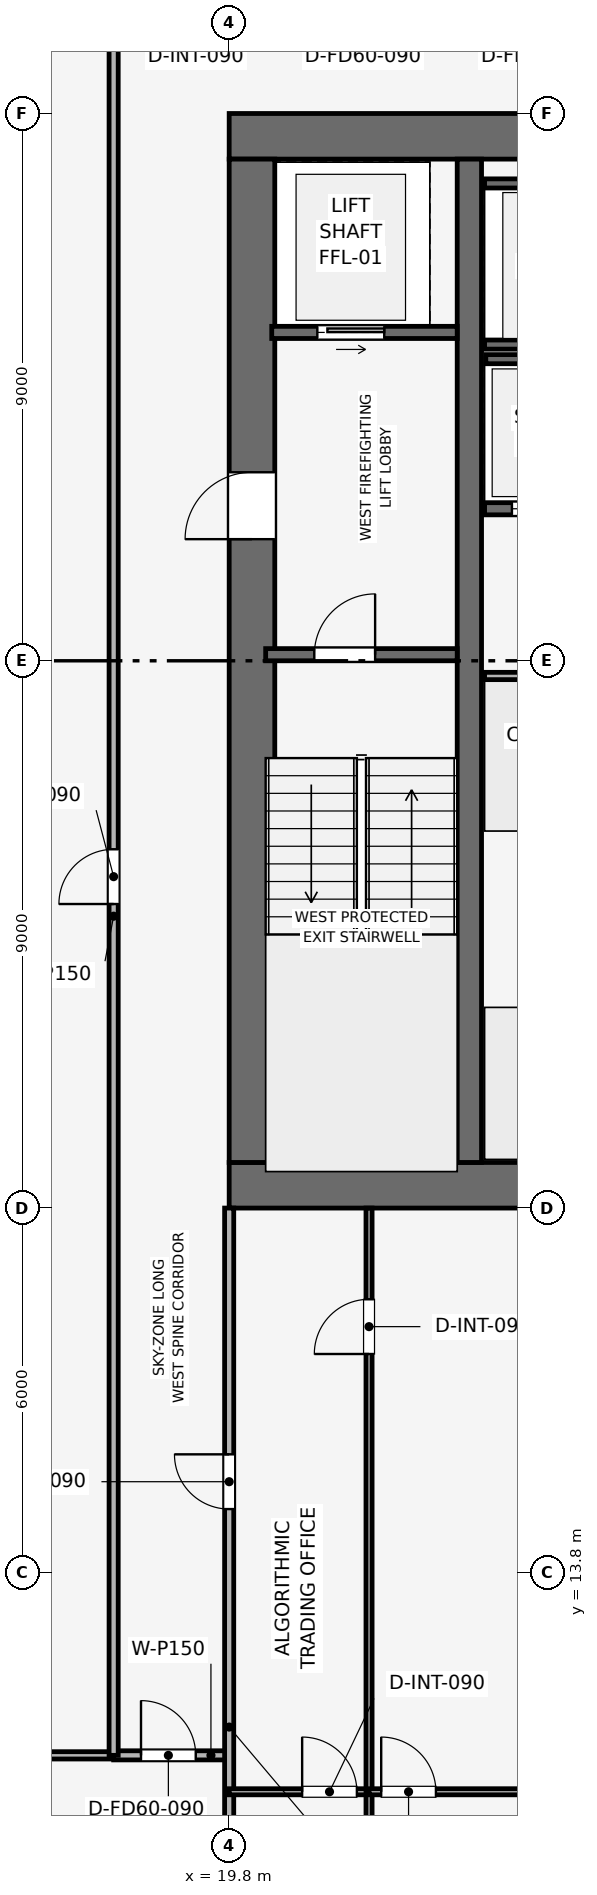
"""IFC4 building model, lengths in metres.
Left out: names, types, materials, properties, quantities, classifications, styles, units other than length and angle.
Written with IfcOpenShell. Run it as: python <this file> out.ifc"""

import sys

from ifc_helpers import new_model, si_unit, direction, frame, frame_2d, origin, place, context, subcontext, project, spatial, rectangle, extrude, element, fill, save


model = new_model("IFC4")
c1 = context("Model", 3, precision=1e-05, world=origin(), true_north=direction((0.0, 1.0)))
c2 = subcontext(c1, "Body", "Model", "MODEL_VIEW")
j1 = project(units=[si_unit("LENGTHUNIT", "METRE"), si_unit("PLANEANGLEUNIT", "RADIAN")], contexts=[c1])
p1 = place(None, origin())
s1 = spatial("IfcSite", under=j1, at=p1, CompositionType="ELEMENT")
p2 = place(p1, origin())
s2 = spatial("IfcBuilding", under=s1, at=p2, CompositionType="ELEMENT")
p3 = place(p2, frame((0.0, 0.0, 280.35)))
s3 = spatial("IfcBuildingStorey", under=s2, at=p3, CompositionType="ELEMENT", Elevation=280.35)
p4 = place(p3, frame((19.8, 20.175, 0.0), z_axis=(0.0, 0.0, 1.0), x_axis=(1.0, 0.0, 0.0)))
e1 = element("IfcWall", 1, at=p4, inside=s3, PredefinedType="SHEAR", context=c2, shape_type="SweptSolid", body=[
    extrude(rectangle(XDim=18.0, YDim=0.75, at=frame_2d((9.0, 0.0))), origin(), (0.0, 0.0, 1.0), 3.75),
])
p5 = place(p3, frame((19.8, 37.425, 0.0), z_axis=(0.0, 0.0, 1.0), x_axis=(1.0, 0.0, 0.0)))
e2 = element("IfcWall", 2, at=p5, inside=s3, PredefinedType="SHEAR", context=c2, shape_type="SweptSolid", body=[
    extrude(rectangle(XDim=18.0, YDim=0.75, at=frame_2d((9.0, 0.0))), origin(), (0.0, 0.0, 1.0), 3.75),
])
p6 = place(p5, frame((7.05, 0.0, 0.0)))
e3 = element("IfcOpeningElement", 3, at=p6, cuts=e2, PredefinedType="OPENING", context=c2, shape_type="SweptSolid", body=[
    extrude(rectangle(XDim=1.1, YDim=2.15, at=frame_2d((0.55, 1.075))), frame((0.0, 0.385, 0.0), z_axis=(0.0, -1.0, 0.0), x_axis=(1.0, 0.0, 0.0)), (0.0, 0.0, 1.0), 0.77),
])
p7 = place(p3, frame((20.175, 20.55, 0.0), z_axis=(0.0, 0.0, 1.0), x_axis=(0.0, 1.0, 0.0)))
e4 = element("IfcWall", 4, at=p7, inside=s3, PredefinedType="SHEAR", context=c2, shape_type="SweptSolid", body=[
    extrude(rectangle(XDim=16.5, YDim=0.75, at=frame_2d((8.25, 0.0))), origin(), (0.0, 0.0, 1.0), 3.75),
])
p8 = place(p7, frame((10.25, 0.0, 0.0)))
e5 = element("IfcOpeningElement", 5, at=p8, cuts=e4, PredefinedType="OPENING", context=c2, shape_type="SweptSolid", body=[
    extrude(rectangle(XDim=1.1, YDim=2.15, at=frame_2d((0.55, 1.075))), frame((0.0, 0.385, 0.0), z_axis=(0.0, -1.0, 0.0), x_axis=(1.0, 0.0, 0.0)), (0.0, 0.0, 1.0), 0.77),
])
p9 = place(p3, frame((23.75, 20.55, 0.0), z_axis=(0.0, 0.0, 1.0), x_axis=(0.0, 1.0, 0.0)))
e6 = element("IfcWall", 6, at=p9, inside=s3, PredefinedType="SHEAR", context=c2, shape_type="SweptSolid", body=[
    extrude(rectangle(XDim=16.5, YDim=0.4, at=frame_2d((8.25, 0.0))), origin(), (0.0, 0.0, 1.0), 3.75),
])
p10 = place(p3, frame((20.4, 28.9, 0.0), z_axis=(0.0, 0.0, 1.0), x_axis=(1.0, 0.0, 0.0)))
e7 = element("IfcWall", 7, at=p10, inside=s3, PredefinedType="SHEAR", context=c2, shape_type="SweptSolid", body=[
    extrude(rectangle(XDim=3.15, YDim=0.2, at=frame_2d((1.575, 0.0))), origin(), (0.0, 0.0, 1.0), 3.39),
])
p11 = place(p10, frame((0.8, 0.0, 0.0)))
e8 = element("IfcOpeningElement", 8, at=p11, cuts=e7, PredefinedType="OPENING", context=c2, shape_type="SweptSolid", body=[
    extrude(rectangle(XDim=1.0, YDim=2.1, at=frame_2d((0.5, 1.05))), frame((0.0, 0.11, 0.0), z_axis=(0.0, -1.0, 0.0), x_axis=(1.0, 0.0, 0.0)), (0.0, 0.0, 1.0), 0.22),
])
p12 = place(p3, frame((20.5, 34.2, 0.0), z_axis=(0.0, 0.0, 1.0), x_axis=(1.0, 0.0, 0.0)))
e9 = element("IfcWall", 9, at=p12, inside=s3, PredefinedType="SHEAR", context=c2, shape_type="SweptSolid", body=[
    extrude(rectangle(XDim=3.05, YDim=0.2, at=frame_2d((1.525, 0.0))), origin(), (0.0, 0.0, 1.0), 3.39),
])
p13 = place(p12, frame((0.75, 0.0, 0.0)))
e10 = element("IfcOpeningElement", 10, at=p13, cuts=e9, PredefinedType="OPENING", context=c2, shape_type="SweptSolid", body=[
    extrude(rectangle(XDim=1.1, YDim=2.15, at=frame_2d((0.55, 1.075))), frame((0.0, 0.11, 0.0), z_axis=(0.0, -1.0, 0.0), x_axis=(1.0, 0.0, 0.0)), (0.0, 0.0, 1.0), 0.22),
])
for number, where, z_axis, x_axis in (
    (11, (24.0, 34.0, 0.0), (0.0, 0.0, 1.0), (1.0, 0.0, 0.0)),
    (12, (24.0, 36.65, 0.0), (0.0, 0.0, 1.0), (1.0, 0.0, 0.0)),
):
    element("IfcWall", number, at=place(p3, frame(where, z_axis=z_axis, x_axis=x_axis)), inside=s3, PredefinedType="SHEAR", context=c2, shape_type="SweptSolid", body=[
        extrude(rectangle(XDim=2.48, YDim=0.15, at=frame_2d((1.24, 0.0))), origin(), (0.0, 0.0, 1.0), 3.39),
    ])
p14 = place(p3, frame((24.0, 31.3, 0.0), z_axis=(0.0, 0.0, 1.0), x_axis=(1.0, 0.0, 0.0)))
e13 = element("IfcWall", 13, at=p14, inside=s3, PredefinedType="SHEAR", context=c2, shape_type="SweptSolid", body=[
    extrude(rectangle(XDim=2.0, YDim=0.2, at=frame_2d((1.0, 0.0))), origin(), (0.0, 0.0, 1.0), 3.39),
])
p15 = place(p14, frame((0.45, 0.0, 0.0)))
e14 = element("IfcOpeningElement", 14, at=p15, cuts=e13, PredefinedType="OPENING", context=c2, shape_type="SweptSolid", body=[
    extrude(rectangle(XDim=1.1, YDim=2.15, at=frame_2d((0.55, 1.075))), frame((0.0, 0.11, 0.0), z_axis=(0.0, -1.0, 0.0), x_axis=(1.0, 0.0, 0.0)), (0.0, 0.0, 1.0), 0.22),
])
p16 = place(p3, frame((24.02, 33.76, 0.0), z_axis=(0.0, 0.0, 1.0), x_axis=(1.0, 0.0, 0.0)))
e15 = element("IfcWall", 15, at=p16, inside=s3, PredefinedType="SHEAR", context=c2, shape_type="SweptSolid", body=[
    extrude(rectangle(XDim=4.08, YDim=0.15, at=frame_2d((2.04, 0.0))), origin(), (0.0, 0.0, 1.0), 3.39),
])
p17 = place(p3, frame((24.0, 28.55, 0.0), z_axis=(0.0, 0.0, 1.0), x_axis=(1.0, 0.0, 0.0)))
e16 = element("IfcWall", 16, at=p17, inside=s3, PredefinedType="PARTITIONING", context=c2, shape_type="SweptSolid", body=[
    extrude(rectangle(XDim=4.05, YDim=0.12, at=frame_2d((2.025, 0.0))), origin(), (0.0, 0.0, 1.0), 3.39),
])
p18 = place(p17, frame((1.575, 0.0, 0.0)))
e17 = element("IfcOpeningElement", 17, at=p18, cuts=e16, PredefinedType="OPENING", context=c2, shape_type="SweptSolid", body=[
    extrude(rectangle(XDim=0.9, YDim=2.1, at=frame_2d((0.45, 1.05))), frame((0.0, 0.07, 0.0), z_axis=(0.0, -1.0, 0.0), x_axis=(1.0, 0.0, 0.0)), (0.0, 0.0, 1.0), 0.14),
])
p19 = place(p3, frame((10.8, 10.8, 0.0), z_axis=(0.0, 0.0, 1.0), x_axis=(1.0, 0.0, 0.0)))
e18 = element("IfcWall", 18, at=p19, inside=s3, PredefinedType="PARTITIONING", context=c2, shape_type="SweptSolid", body=[
    extrude(rectangle(XDim=7.1, YDim=0.12, at=frame_2d((3.55, 0.0))), origin(), (0.0, 0.0, 1.0), 2.975),
])
p20 = place(p3, frame((17.9, 10.8, 0.0), z_axis=(0.0, 0.0, 1.0), x_axis=(1.0, 0.0, 0.0)))
e19 = element("IfcWall", 19, at=p20, inside=s3, PredefinedType="PARTITIONING", context=c2, shape_type="SweptSolid", body=[
    extrude(rectangle(XDim=1.9, YDim=0.15, at=frame_2d((0.95, 0.0))), origin(), (0.0, 0.0, 1.0), 3.39),
])
p21 = place(p20, frame((0.45, 0.0, 0.0)))
e20 = element("IfcOpeningElement", 20, at=p21, cuts=e19, PredefinedType="OPENING", context=c2, shape_type="SweptSolid", body=[
    extrude(rectangle(XDim=0.9, YDim=2.1, at=frame_2d((0.45, 1.05))), frame((0.0, 0.085, 0.0), z_axis=(0.0, -1.0, 0.0), x_axis=(1.0, 0.0, 0.0)), (0.0, 0.0, 1.0), 0.17),
])
p22 = place(p3, frame((19.8, 4.03, 0.0), z_axis=(0.0, 0.0, 1.0), x_axis=(0.0, 1.0, 0.0)))
e21 = element("IfcWall", 21, at=p22, inside=s3, PredefinedType="PARTITIONING", context=c2, shape_type="SweptSolid", body=[
    extrude(rectangle(XDim=15.77, YDim=0.15, at=frame_2d((7.885, 0.0))), origin(), (0.0, 0.0, 1.0), 2.975),
])
p23 = place(p22, frame((10.82, 0.0, 0.0)))
e22 = element("IfcOpeningElement", 22, at=p23, cuts=e21, PredefinedType="OPENING", context=c2, shape_type="SweptSolid", body=[
    extrude(rectangle(XDim=0.9, YDim=2.1, at=frame_2d((0.45, 1.05))), frame((0.0, 0.085, 0.0), z_axis=(0.0, -1.0, 0.0), x_axis=(1.0, 0.0, 0.0)), (0.0, 0.0, 1.0), 0.17),
])
p24 = place(p3, frame((19.8, 10.201, 0.0), z_axis=(0.0, 0.0, 1.0), x_axis=(1.0, 0.0, 0.0)))
e23 = element("IfcWall", 23, at=p24, inside=s3, PredefinedType="MOVABLE", context=c2, shape_type="SweptSolid", body=[
    extrude(rectangle(XDim=2.3, YDim=0.1, at=frame_2d((1.15, 0.0))), origin(), (0.0, 0.0, 1.0), 2.975),
])
p25 = place(p24, frame((1.2, 0.0, 0.0)))
e24 = element("IfcOpeningElement", 24, at=p25, cuts=e23, PredefinedType="OPENING", context=c2, shape_type="SweptSolid", body=[
    extrude(rectangle(XDim=0.9, YDim=2.1, at=frame_2d((0.45, 1.05))), frame((0.0, 0.06, 0.0), z_axis=(0.0, -1.0, 0.0), x_axis=(1.0, 0.0, 0.0)), (0.0, 0.0, 1.0), 0.12),
])
p26 = place(p3, frame((22.1, 4.03, 0.0), z_axis=(0.0, 0.0, 1.0), x_axis=(0.0, 1.0, 0.0)))
e25 = element("IfcWall", 25, at=p26, inside=s3, PredefinedType="MOVABLE", context=c2, shape_type="SweptSolid", body=[
    extrude(rectangle(XDim=15.77, YDim=0.1, at=frame_2d((7.885, 0.0))), origin(), (0.0, 0.0, 1.0), 2.975),
])
p27 = place(p26, frame((13.37, 0.0, 0.0)))
e26 = element("IfcOpeningElement", 26, at=p27, cuts=e25, PredefinedType="OPENING", context=c2, shape_type="SweptSolid", body=[
    extrude(rectangle(XDim=0.9, YDim=2.1, at=frame_2d((0.45, 1.05))), frame((0.0, 0.06, 0.0), z_axis=(0.0, -1.0, 0.0), x_axis=(1.0, 0.0, 0.0)), (0.0, 0.0, 1.0), 0.12),
])
p28 = place(p3, frame((22.1, 10.201, 0.0), z_axis=(0.0, 0.0, 1.0), x_axis=(1.0, 0.0, 0.0)))
e27 = element("IfcWall", 27, at=p28, inside=s3, PredefinedType="MOVABLE", context=c2, shape_type="SweptSolid", body=[
    extrude(rectangle(XDim=10.992, YDim=0.1, at=frame_2d((5.496, 0.0))), origin(), (0.0, 0.0, 1.0), 2.975),
])
p29 = place(p28, frame((0.2, 0.0, 0.0)))
e28 = element("IfcOpeningElement", 28, at=p29, cuts=e27, PredefinedType="OPENING", context=c2, shape_type="SweptSolid", body=[
    extrude(rectangle(XDim=0.9, YDim=2.1, at=frame_2d((0.45, 1.05))), frame((0.0, 0.06, 0.0), z_axis=(0.0, -1.0, 0.0), x_axis=(1.0, 0.0, 0.0)), (0.0, 0.0, 1.0), 0.12),
])
p30 = place(p3, frame((17.9, 10.8, 0.0), z_axis=(0.0, 0.0, 1.0), x_axis=(0.0, 1.0, 0.0)))
e29 = element("IfcWall", 29, at=p30, inside=s3, PredefinedType="PARTITIONING", context=c2, shape_type="SweptSolid", body=[
    extrude(rectangle(XDim=28.9, YDim=0.15, at=frame_2d((14.45, 0.0))), origin(), (0.0, 0.0, 1.0), 2.975),
])
p31 = place(p30, frame((14.0, 0.0, 0.0)))
e30 = element("IfcOpeningElement", 30, at=p31, cuts=e29, PredefinedType="OPENING", context=c2, shape_type="SweptSolid", body=[
    extrude(rectangle(XDim=0.9, YDim=2.1, at=frame_2d((0.45, 1.05))), frame((0.0, 0.085, 0.0), z_axis=(0.0, -1.0, 0.0), x_axis=(1.0, 0.0, 0.0)), (0.0, 0.0, 1.0), 0.17),
])
p32 = place(p11, origin())
e31 = element("IfcDoor", 31, at=p32, inside=s3, OperationType="SINGLE_SWING_RIGHT", PredefinedType="DOOR", context=c2, shape_type="SweptSolid", body=[
    extrude(rectangle(XDim=1.0, YDim=2.1, at=frame_2d((0.5, 1.05))), frame((0.0, 0.025, 0.0), z_axis=(0.0, -1.0, 0.0), x_axis=(1.0, 0.0, 0.0)), (0.0, 0.0, 1.0), 0.05),
])
fill(e8, e31)
p33 = place(p13, origin())
e32 = element("IfcDoor", 32, at=p33, inside=s3, OperationType="SLIDING_TO_RIGHT", PredefinedType="DOOR", context=c2, shape_type="SweptSolid", body=[
    extrude(rectangle(XDim=1.1, YDim=2.15, at=frame_2d((0.55, 1.075))), frame((0.0, 0.025, 0.0), z_axis=(0.0, -1.0, 0.0), x_axis=(1.0, 0.0, 0.0)), (0.0, 0.0, 1.0), 0.05),
])
fill(e10, e32)
p34 = place(p15, origin())
e33 = element("IfcDoor", 33, at=p34, inside=s3, OperationType="SLIDING_TO_RIGHT", PredefinedType="DOOR", context=c2, shape_type="SweptSolid", body=[
    extrude(rectangle(XDim=1.1, YDim=2.15, at=frame_2d((0.55, 1.075))), frame((0.0, 0.025, 0.0), z_axis=(0.0, -1.0, 0.0), x_axis=(1.0, 0.0, 0.0)), (0.0, 0.0, 1.0), 0.05),
])
fill(e14, e33)
p35 = place(p21, origin())
e34 = element("IfcDoor", 34, at=p35, inside=s3, OperationType="SINGLE_SWING_LEFT", PredefinedType="DOOR", context=c2, shape_type="SweptSolid", body=[
    extrude(rectangle(XDim=0.9, YDim=2.1, at=frame_2d((0.45, 1.05))), frame((0.0, 0.025, 0.0), z_axis=(0.0, -1.0, 0.0), x_axis=(1.0, 0.0, 0.0)), (0.0, 0.0, 1.0), 0.05),
])
fill(e20, e34)
p36 = place(p23, origin())
e35 = element("IfcDoor", 35, at=p36, inside=s3, OperationType="SINGLE_SWING_RIGHT", PredefinedType="DOOR", context=c2, shape_type="SweptSolid", body=[
    extrude(rectangle(XDim=0.9, YDim=2.1, at=frame_2d((0.45, 1.05))), frame((0.0, 0.025, 0.0), z_axis=(0.0, -1.0, 0.0), x_axis=(1.0, 0.0, 0.0)), (0.0, 0.0, 1.0), 0.05),
])
fill(e22, e35)
p37 = place(p25, origin())
e36 = element("IfcDoor", 36, at=p37, inside=s3, OperationType="SINGLE_SWING_LEFT", PredefinedType="DOOR", context=c2, shape_type="SweptSolid", body=[
    extrude(rectangle(XDim=0.9, YDim=2.1, at=frame_2d((0.45, 1.05))), frame((0.0, 0.025, 0.0), z_axis=(0.0, -1.0, 0.0), x_axis=(1.0, 0.0, 0.0)), (0.0, 0.0, 1.0), 0.05),
])
fill(e24, e36)
p38 = place(p27, origin())
e37 = element("IfcDoor", 37, at=p38, inside=s3, OperationType="SINGLE_SWING_LEFT", PredefinedType="DOOR", context=c2, shape_type="SweptSolid", body=[
    extrude(rectangle(XDim=0.9, YDim=2.1, at=frame_2d((0.45, 1.05))), frame((0.0, 0.025, 0.0), z_axis=(0.0, -1.0, 0.0), x_axis=(1.0, 0.0, 0.0)), (0.0, 0.0, 1.0), 0.05),
])
fill(e26, e37)
p39 = place(p29, origin())
e38 = element("IfcDoor", 38, at=p39, inside=s3, OperationType="SINGLE_SWING_LEFT", PredefinedType="DOOR", context=c2, shape_type="SweptSolid", body=[
    extrude(rectangle(XDim=0.9, YDim=2.1, at=frame_2d((0.45, 1.05))), frame((0.0, 0.025, 0.0), z_axis=(0.0, -1.0, 0.0), x_axis=(1.0, 0.0, 0.0)), (0.0, 0.0, 1.0), 0.05),
])
fill(e28, e38)
p40 = place(p31, origin())
e39 = element("IfcDoor", 39, at=p40, inside=s3, OperationType="SINGLE_SWING_LEFT", PredefinedType="DOOR", context=c2, shape_type="SweptSolid", body=[
    extrude(rectangle(XDim=0.9, YDim=2.1, at=frame_2d((0.45, 1.05))), frame((0.0, 0.025, 0.0), z_axis=(0.0, -1.0, 0.0), x_axis=(1.0, 0.0, 0.0)), (0.0, 0.0, 1.0), 0.05),
])
fill(e30, e39)
p41 = place(p8, origin())
e40 = element("IfcDoor", 40, at=p41, inside=s3, OperationType="SINGLE_SWING_LEFT", PredefinedType="DOOR", context=c2, shape_type="SweptSolid", body=[
    extrude(rectangle(XDim=1.1, YDim=2.15, at=frame_2d((0.55, 1.075))), frame((0.0, 0.025, 0.0), z_axis=(0.0, -1.0, 0.0), x_axis=(1.0, 0.0, 0.0)), (0.0, 0.0, 1.0), 0.05),
])
fill(e5, e40)
save(model, sys.argv[1])
